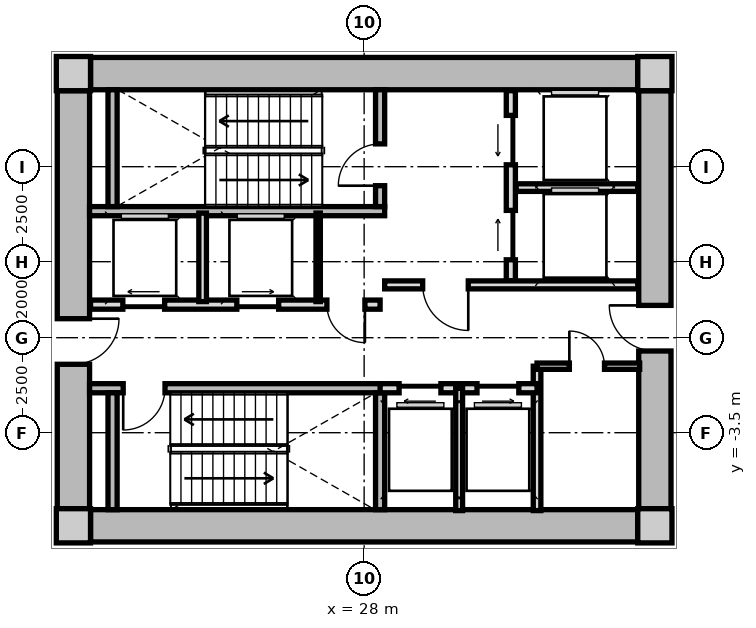
"""IFC4 building model, lengths in metres.
Left out: names, types, materials, properties, quantities, classifications, styles, units other than length and angle.
Written with IfcOpenShell. Run it as: python <this file> out.ifc"""

import sys

from ifc_helpers import new_model, si_unit, direction, frame, frame_2d, origin, origin_2d, place, context, subcontext, project, spatial, rectangle, extrude, source, transform, mapped, element, fill, save


model = new_model("IFC4")
c1 = context("Model", 3, precision=1e-05, world=origin(), true_north=direction((0.0, 1.0)))
c2 = subcontext(c1, "Body", "Model", "MODEL_VIEW")
j1 = project(units=[si_unit("LENGTHUNIT", "METRE"), si_unit("PLANEANGLEUNIT", "RADIAN")], contexts=[c1])
p1 = place(None, origin())
s1 = spatial("IfcSite", under=j1, at=p1, CompositionType="ELEMENT")
p2 = place(p1, origin())
s2 = spatial("IfcBuilding", under=s1, at=p2, CompositionType="ELEMENT")
p3 = place(p2, origin())
s3 = spatial("IfcBuildingStorey", under=s2, at=p3, CompositionType="ELEMENT", Elevation=0.0)
m1 = source(origin(), c2, "Body", "SweptSolid", [
    extrude(rectangle(XDim=0.9, YDim=0.9, at=origin_2d()), origin(), (0.0, 0.0, 1.0), 4.2),
])
for number, where, z_axis, x_axis in (
    (1, (20.35, -5.95, 0.0), (0.0, 0.0, 1.0), (1.0, 0.0, 0.0)),
    (2, (35.65, -5.95, 0.0), (0.0, 0.0, 1.0), (1.0, 0.0, 0.0)),
    (3, (35.65, 5.95, 0.0), (0.0, 0.0, 1.0), (1.0, 0.0, 0.0)),
    (4, (20.35, 5.95, 0.0), (0.0, 0.0, 1.0), (1.0, 0.0, 0.0)),
):
    element("IfcColumn", number, at=place(p3, frame(where, z_axis=z_axis, x_axis=x_axis)), inside=s3, PredefinedType="COLUMN", context=c2, shape_type="MappedRepresentation", body=[
        mapped(m1, transform((0.0, 0.0, 0.0), x_axis=(1.0, 0.0, 0.0), y_axis=(0.0, 1.0, 0.0), z_axis=(0.0, 0.0, 1.0), scale=1.0)),
    ])
m2 = source(origin(), c2, "Body", "SweptSolid", [
    extrude(rectangle(XDim=14.4, YDim=0.85, at=frame_2d((7.2, 0.0))), origin(), (0.0, 0.0, 1.0), 3.88),
])
for number, where, z_axis, x_axis in (
    (5, (20.8, 5.95, 0.0), (0.0, 0.0, 1.0), (1.0, 0.0, 0.0)),
    (6, (35.2, -5.95, 0.0), (0.0, 0.0, 1.0), (-1.0, 0.0, 0.0)),
):
    element("IfcWall", number, at=place(p3, frame(where, z_axis=z_axis, x_axis=x_axis)), inside=s3, PredefinedType="SHEAR", context=c2, shape_type="MappedRepresentation", body=[
        mapped(m2, transform((0.0, 0.0, 0.0), x_axis=(1.0, 0.0, 0.0), y_axis=(0.0, 1.0, 0.0), z_axis=(0.0, 0.0, 1.0), scale=1.0)),
    ])
m3 = source(origin(), c2, "Body", "SweptSolid", [
    extrude(rectangle(XDim=11.0, YDim=0.85, at=frame_2d((5.5, 0.0))), origin(), (0.0, 0.0, 1.0), 3.88),
])
p4 = place(p3, frame((20.35, -5.5, 0.0), z_axis=(0.0, 0.0, 1.0), x_axis=(0.0, 1.0, 0.0)))
e7 = element("IfcWall", 7, at=p4, inside=s3, PredefinedType="SHEAR", context=c2, shape_type="MappedRepresentation", body=[
    mapped(m3, transform((0.0, 0.0, 0.0), x_axis=(1.0, 0.0, 0.0), y_axis=(0.0, 1.0, 0.0), z_axis=(0.0, 0.0, 1.0), scale=1.0)),
])
p5 = place(p4, frame((3.8, 0.0, 0.0)))
e8 = element("IfcOpeningElement", 8, at=p5, cuts=e7, PredefinedType="OPENING", context=c2, shape_type="SweptSolid", body=[
    extrude(rectangle(XDim=1.2, YDim=2.15, at=frame_2d((0.6, 1.075))), frame((0.0, 0.435, 0.0), z_axis=(0.0, -1.0, 0.0), x_axis=(1.0, 0.0, 0.0)), (0.0, 0.0, 1.0), 0.87),
])
p6 = place(p3, frame((35.65, 5.5, 0.0), z_axis=(0.0, 0.0, 1.0), x_axis=(0.0, -1.0, 0.0)))
e9 = element("IfcWall", 9, at=p6, inside=s3, PredefinedType="SHEAR", context=c2, shape_type="MappedRepresentation", body=[
    mapped(m3, transform((0.0, 0.0, 0.0), x_axis=(1.0, 0.0, 0.0), y_axis=(0.0, 1.0, 0.0), z_axis=(0.0, 0.0, 1.0), scale=1.0)),
])
p7 = place(p6, frame((5.65, 0.0, 0.0)))
e10 = element("IfcOpeningElement", 10, at=p7, cuts=e9, PredefinedType="OPENING", context=c2, shape_type="SweptSolid", body=[
    extrude(rectangle(XDim=1.2, YDim=2.15, at=frame_2d((0.6, 1.075))), frame((0.0, 0.435, 0.0), z_axis=(0.0, -1.0, 0.0), x_axis=(1.0, 0.0, 0.0)), (0.0, 0.0, 1.0), 0.87),
])
m4 = source(origin(), c2, "Body", "SweptSolid", [
    extrude(rectangle(XDim=7.765, YDim=0.24, at=frame_2d((3.883, 0.0))), origin(), (0.0, 0.0, 1.0), 3.88),
])
p8 = place(p3, frame((20.775, 2.33, 0.0), z_axis=(0.0, 0.0, 1.0), x_axis=(1.0, 0.0, 0.0)))
e11 = element("IfcWall", 11, at=p8, inside=s3, PredefinedType="PARTITIONING", context=c2, shape_type="MappedRepresentation", body=[
    mapped(m4, transform((0.0, 0.0, 0.0), x_axis=(1.0, 0.0, 0.0), y_axis=(0.0, 1.0, 0.0), z_axis=(0.0, 0.0, 1.0), scale=1.0)),
])
m5 = source(origin(), c2, "Body", "SweptSolid", [
    extrude(rectangle(XDim=3.075, YDim=0.24, at=frame_2d((1.538, 0.0))), origin(), (0.0, 0.0, 1.0), 3.88),
])
p9 = place(p3, frame((21.38, 2.45, 0.0), z_axis=(0.0, 0.0, 1.0), x_axis=(0.0, 1.0, 0.0)))
e12 = element("IfcWall", 12, at=p9, inside=s3, PredefinedType="PARTITIONING", context=c2, shape_type="MappedRepresentation", body=[
    mapped(m5, transform((0.0, 0.0, 0.0), x_axis=(1.0, 0.0, 0.0), y_axis=(0.0, 1.0, 0.0), z_axis=(0.0, 0.0, 1.0), scale=1.0)),
])
p10 = place(p3, frame((28.42, 2.45, 0.0), z_axis=(0.0, 0.0, 1.0), x_axis=(0.0, 1.0, 0.0)))
e13 = element("IfcWall", 13, at=p10, inside=s3, PredefinedType="PARTITIONING", context=c2, shape_type="MappedRepresentation", body=[
    mapped(m5, transform((0.0, 0.0, 0.0), x_axis=(1.0, 0.0, 0.0), y_axis=(0.0, 1.0, 0.0), z_axis=(0.0, 0.0, 1.0), scale=1.0)),
])
p11 = place(p10, frame((0.55, 0.0, 0.0)))
e14 = element("IfcOpeningElement", 14, at=p11, cuts=e13, PredefinedType="OPENING", context=c2, shape_type="SweptSolid", body=[
    extrude(rectangle(XDim=1.1, YDim=2.15, at=frame_2d((0.55, 1.075))), frame((0.0, 0.13, 0.0), z_axis=(0.0, -1.0, 0.0), x_axis=(1.0, 0.0, 0.0)), (0.0, 0.0, 1.0), 0.26),
])
p12 = place(p3, frame((20.775, -2.33, 0.0), z_axis=(0.0, 0.0, 1.0), x_axis=(1.0, 0.0, 0.0)))
e15 = element("IfcWall", 15, at=p12, inside=s3, PredefinedType="PARTITIONING", context=c2, shape_type="MappedRepresentation", body=[
    mapped(m4, transform((0.0, 0.0, 0.0), x_axis=(1.0, 0.0, 0.0), y_axis=(0.0, 1.0, 0.0), z_axis=(0.0, 0.0, 1.0), scale=1.0)),
])
p13 = place(p12, frame((0.885, 0.0, 0.0)))
e16 = element("IfcOpeningElement", 16, at=p13, cuts=e15, PredefinedType="OPENING", context=c2, shape_type="SweptSolid", body=[
    extrude(rectangle(XDim=1.1, YDim=2.15, at=frame_2d((0.55, 1.075))), frame((0.0, 0.13, 0.0), z_axis=(0.0, -1.0, 0.0), x_axis=(1.0, 0.0, 0.0)), (0.0, 0.0, 1.0), 0.26),
])
for number, where, z_axis, x_axis in (
    (17, (21.38, -5.525, 0.0), (0.0, 0.0, 1.0), (0.0, 1.0, 0.0)),
    (18, (28.42, -5.525, 0.0), (0.0, 0.0, 1.0), (0.0, 1.0, 0.0)),
):
    element("IfcWall", number, at=place(p3, frame(where, z_axis=z_axis, x_axis=x_axis)), inside=s3, PredefinedType="PARTITIONING", context=c2, shape_type="MappedRepresentation", body=[
        mapped(m5, transform((0.0, 0.0, 0.0), x_axis=(1.0, 0.0, 0.0), y_axis=(0.0, 1.0, 0.0), z_axis=(0.0, 0.0, 1.0), scale=1.0)),
    ])
m6 = source(origin(), c2, "Body", "SweptSolid", [
    extrude(rectangle(XDim=5.0, YDim=0.24, at=frame_2d((2.5, 0.0))), origin(), (0.0, 0.0, 1.0), 3.865),
])
p14 = place(p3, frame((31.86, 0.5, 0.0), z_axis=(0.0, 0.0, 1.0), x_axis=(0.0, 1.0, 0.0)))
e19 = element("IfcWall", 19, at=p14, inside=s3, PredefinedType="PARTITIONING", context=c2, shape_type="MappedRepresentation", body=[
    mapped(m6, transform((0.0, 0.0, 0.0), x_axis=(1.0, 0.0, 0.0), y_axis=(0.0, 1.0, 0.0), z_axis=(0.0, 0.0, 1.0), scale=1.0)),
])
p15 = place(p14, frame((3.05, 0.0, 0.0)))
e20 = element("IfcOpeningElement", 20, at=p15, cuts=e19, PredefinedType="OPENING", context=c2, shape_type="SweptSolid", body=[
    extrude(rectangle(XDim=1.3, YDim=2.2, at=frame_2d((0.65, 1.1))), frame((0.0, 0.13, 0.0), z_axis=(0.0, -1.0, 0.0), x_axis=(1.0, 0.0, 0.0)), (0.0, 0.0, 1.0), 0.26),
])
p16 = place(p14, frame((0.55, 0.0, 0.0)))
e21 = element("IfcOpeningElement", 21, at=p16, cuts=e19, PredefinedType="OPENING", context=c2, shape_type="SweptSolid", body=[
    extrude(rectangle(XDim=1.3, YDim=2.2, at=frame_2d((0.65, 1.1))), frame((0.0, 0.13, 0.0), z_axis=(0.0, -1.0, 0.0), x_axis=(1.0, 0.0, 0.0)), (0.0, 0.0, 1.0), 0.26),
])
m7 = source(origin(), c2, "Body", "SweptSolid", [
    extrude(rectangle(XDim=3.2, YDim=0.2, at=frame_2d((1.6, 0.0))), origin(), (0.0, 0.0, 1.0), 3.865),
])
p17 = place(p3, frame((32.0, 2.95, 0.0), z_axis=(0.0, 0.0, 1.0), x_axis=(1.0, 0.0, 0.0)))
e22 = element("IfcWall", 22, at=p17, inside=s3, PredefinedType="PARTITIONING", context=c2, shape_type="MappedRepresentation", body=[
    mapped(m7, transform((0.0, 0.0, 0.0), x_axis=(1.0, 0.0, 0.0), y_axis=(0.0, 1.0, 0.0), z_axis=(0.0, 0.0, 1.0), scale=1.0)),
])
m8 = source(origin(), c2, "Body", "SweptSolid", [
    extrude(rectangle(XDim=6.66, YDim=0.21, at=frame_2d((3.33, 0.0))), origin(), (0.0, 0.0, 1.0), 3.865),
])
p18 = place(p3, frame((28.54, 0.39, 0.0), z_axis=(0.0, 0.0, 1.0), x_axis=(1.0, 0.0, 0.0)))
e23 = element("IfcWall", 23, at=p18, inside=s3, PredefinedType="PARTITIONING", context=c2, shape_type="MappedRepresentation", body=[
    mapped(m8, transform((0.0, 0.0, 0.0), x_axis=(1.0, 0.0, 0.0), y_axis=(0.0, 1.0, 0.0), z_axis=(0.0, 0.0, 1.0), scale=1.0)),
])
p19 = place(p18, frame((1.0, 0.0, 0.0)))
e24 = element("IfcOpeningElement", 24, at=p19, cuts=e23, PredefinedType="OPENING", context=c2, shape_type="SweptSolid", body=[
    extrude(rectangle(XDim=1.2, YDim=2.15, at=frame_2d((0.6, 1.075))), frame((0.0, 0.115, 0.0), z_axis=(0.0, -1.0, 0.0), x_axis=(1.0, 0.0, 0.0)), (0.0, 0.0, 1.0), 0.23),
])
m9 = source(origin(), c2, "Body", "SweptSolid", [
    extrude(rectangle(XDim=7.62, YDim=0.24, at=frame_2d((3.81, 0.0))), origin(), (0.0, 0.0, 1.0), 3.865),
])
p20 = place(p3, frame((20.8, -0.13, 0.0), z_axis=(0.0, 0.0, 1.0), x_axis=(1.0, 0.0, 0.0)))
e25 = element("IfcWall", 25, at=p20, inside=s3, PredefinedType="PARTITIONING", context=c2, shape_type="MappedRepresentation", body=[
    mapped(m9, transform((0.0, 0.0, 0.0), x_axis=(1.0, 0.0, 0.0), y_axis=(0.0, 1.0, 0.0), z_axis=(0.0, 0.0, 1.0), scale=1.0)),
])
p21 = place(p20, frame((6.22, 0.0, 0.0)))
e26 = element("IfcOpeningElement", 26, at=p21, cuts=e25, PredefinedType="OPENING", context=c2, shape_type="SweptSolid", body=[
    extrude(rectangle(XDim=1.0, YDim=2.1, at=frame_2d((0.5, 1.05))), frame((0.0, 0.13, 0.0), z_axis=(0.0, -1.0, 0.0), x_axis=(1.0, 0.0, 0.0)), (0.0, 0.0, 1.0), 0.26),
])
p22 = place(p20, frame((0.85, 0.0, 0.0)))
e27 = element("IfcOpeningElement", 27, at=p22, cuts=e25, PredefinedType="OPENING", context=c2, shape_type="SweptSolid", body=[
    extrude(rectangle(XDim=1.1, YDim=2.2, at=frame_2d((0.55, 1.1))), frame((0.0, 0.13, 0.0), z_axis=(0.0, -1.0, 0.0), x_axis=(1.0, 0.0, 0.0)), (0.0, 0.0, 1.0), 0.26),
])
p23 = place(p20, frame((3.85, 0.0, 0.0)))
e28 = element("IfcOpeningElement", 28, at=p23, cuts=e25, PredefinedType="OPENING", context=c2, shape_type="SweptSolid", body=[
    extrude(rectangle(XDim=1.1, YDim=2.2, at=frame_2d((0.55, 1.1))), frame((0.0, 0.13, 0.0), z_axis=(0.0, -1.0, 0.0), x_axis=(1.0, 0.0, 0.0)), (0.0, 0.0, 1.0), 0.26),
])
m10 = source(origin(), c2, "Body", "SweptSolid", [
    extrude(rectangle(XDim=2.33, YDim=0.115, at=frame_2d((1.165, 0.0))), origin(), (0.0, 0.0, 1.0), 3.865),
])
p24 = place(p3, frame((26.79, -0.05, 0.0), z_axis=(0.0, 0.0, 1.0), x_axis=(0.0, 1.0, 0.0)))
e29 = element("IfcWall", 29, at=p24, inside=s3, PredefinedType="PARTITIONING", context=c2, shape_type="MappedRepresentation", body=[
    mapped(m10, transform((0.0, 0.0, 0.0), x_axis=(1.0, 0.0, 0.0), y_axis=(0.0, 1.0, 0.0), z_axis=(0.0, 0.0, 1.0), scale=1.0)),
])
m11 = source(origin(), c2, "Body", "SweptSolid", [
    extrude(rectangle(XDim=2.33, YDim=0.2, at=frame_2d((1.165, 0.0))), origin(), (0.0, 0.0, 1.0), 3.865),
])
p25 = place(p3, frame((23.75, -0.05, 0.0), z_axis=(0.0, 0.0, 1.0), x_axis=(0.0, 1.0, 0.0)))
e30 = element("IfcWall", 30, at=p25, inside=s3, PredefinedType="PARTITIONING", context=c2, shape_type="MappedRepresentation", body=[
    mapped(m11, transform((0.0, 0.0, 0.0), x_axis=(1.0, 0.0, 0.0), y_axis=(0.0, 1.0, 0.0), z_axis=(0.0, 0.0, 1.0), scale=1.0)),
])
m12 = source(origin(), c2, "Body", "SweptSolid", [
    extrude(rectangle(XDim=3.8, YDim=0.2, at=frame_2d((1.9, 0.0))), origin(), (0.0, 0.0, 1.0), 3.865),
])
p26 = place(p3, frame((32.55, -5.55, 0.0), z_axis=(0.0, 0.0, 1.0), x_axis=(0.0, 1.0, 0.0)))
e31 = element("IfcWall", 31, at=p26, inside=s3, PredefinedType="PARTITIONING", context=c2, shape_type="MappedRepresentation", body=[
    mapped(m12, transform((0.0, 0.0, 0.0), x_axis=(1.0, 0.0, 0.0), y_axis=(0.0, 1.0, 0.0), z_axis=(0.0, 0.0, 1.0), scale=1.0)),
])
m13 = source(origin(), c2, "Body", "SweptSolid", [
    extrude(rectangle(XDim=4.13, YDim=0.24, at=frame_2d((2.065, 0.0))), origin(), (0.0, 0.0, 1.0), 3.865),
])
p27 = place(p3, frame((28.42, -2.33, 0.0), z_axis=(0.0, 0.0, 1.0), x_axis=(1.0, 0.0, 0.0)))
e32 = element("IfcWall", 32, at=p27, inside=s3, PredefinedType="PARTITIONING", context=c2, shape_type="MappedRepresentation", body=[
    mapped(m13, transform((0.0, 0.0, 0.0), x_axis=(1.0, 0.0, 0.0), y_axis=(0.0, 1.0, 0.0), z_axis=(0.0, 0.0, 1.0), scale=1.0)),
])
p28 = place(p27, frame((0.5, 0.0, 0.0)))
e33 = element("IfcOpeningElement", 33, at=p28, cuts=e32, PredefinedType="OPENING", context=c2, shape_type="SweptSolid", body=[
    extrude(rectangle(XDim=1.1, YDim=2.2, at=frame_2d((0.55, 1.1))), frame((0.0, 0.13, 0.0), z_axis=(0.0, -1.0, 0.0), x_axis=(1.0, 0.0, 0.0)), (0.0, 0.0, 1.0), 0.26),
])
p29 = place(p27, frame((2.55, 0.0, 0.0)))
e34 = element("IfcOpeningElement", 34, at=p29, cuts=e32, PredefinedType="OPENING", context=c2, shape_type="SweptSolid", body=[
    extrude(rectangle(XDim=1.1, YDim=2.2, at=frame_2d((0.55, 1.1))), frame((0.0, 0.13, 0.0), z_axis=(0.0, -1.0, 0.0), x_axis=(1.0, 0.0, 0.0)), (0.0, 0.0, 1.0), 0.26),
])
m14 = source(origin(), c2, "Body", "SweptSolid", [
    extrude(rectangle(XDim=3.22, YDim=0.18, at=frame_2d((1.61, 0.0))), origin(), (0.0, 0.0, 1.0), 3.865),
])
p30 = place(p3, frame((30.5, -5.55, 0.0), z_axis=(0.0, 0.0, 1.0), x_axis=(0.0, 1.0, 0.0)))
e35 = element("IfcWall", 35, at=p30, inside=s3, PredefinedType="PARTITIONING", context=c2, shape_type="MappedRepresentation", body=[
    mapped(m14, transform((0.0, 0.0, 0.0), x_axis=(1.0, 0.0, 0.0), y_axis=(0.0, 1.0, 0.0), z_axis=(0.0, 0.0, 1.0), scale=1.0)),
])
m15 = source(origin(), c2, "Body", "SweptSolid", [
    extrude(rectangle(XDim=2.7, YDim=0.165, at=frame_2d((1.35, 0.0))), origin(), (0.0, 0.0, 1.0), 3.865),
])
p31 = place(p3, frame((32.55, -1.75, 0.0), z_axis=(0.0, 0.0, 1.0), x_axis=(1.0, 0.0, 0.0)))
e36 = element("IfcWall", 36, at=p31, inside=s3, PredefinedType="PARTITIONING", context=c2, shape_type="MappedRepresentation", body=[
    mapped(m15, transform((0.0, 0.0, 0.0), x_axis=(1.0, 0.0, 0.0), y_axis=(0.0, 1.0, 0.0), z_axis=(0.0, 0.0, 1.0), scale=1.0)),
])
p32 = place(p31, frame((0.85, 0.0, 0.0)))
e37 = element("IfcOpeningElement", 37, at=p32, cuts=e36, PredefinedType="OPENING", context=c2, shape_type="SweptSolid", body=[
    extrude(rectangle(XDim=0.925, YDim=2.1, at=frame_2d((0.462, 1.05))), frame((0.0, 0.093, 0.0), z_axis=(0.0, -1.0, 0.0), x_axis=(1.0, 0.0, 0.0)), (0.0, 0.0, 1.0), 0.185),
])
m16 = source(origin(), c2, "Body", "SweptSolid", [
    extrude(rectangle(XDim=1.1, YDim=2.15, at=frame_2d((0.55, 1.075))), frame((0.0, 0.025, 0.0), z_axis=(0.0, -1.0, 0.0), x_axis=(1.0, 0.0, 0.0)), (0.0, 0.0, 1.0), 0.05),
])
p33 = place(p11, origin())
e38 = element("IfcDoor", 38, at=p33, inside=s3, OperationType="SINGLE_SWING_LEFT", PredefinedType="DOOR", context=c2, shape_type="MappedRepresentation", body=[
    mapped(m16, transform((0.0, 0.0, 0.0), x_axis=(1.0, 0.0, 0.0), y_axis=(0.0, 1.0, 0.0), z_axis=(0.0, 0.0, 1.0), scale=1.0)),
])
fill(e14, e38)
p34 = place(p13, frame((1.1, 0.0, 0.0), z_axis=(0.0, 0.0, 1.0), x_axis=(-1.0, 0.0, 0.0)))
e39 = element("IfcDoor", 39, at=p34, inside=s3, OperationType="SINGLE_SWING_RIGHT", PredefinedType="DOOR", context=c2, shape_type="MappedRepresentation", body=[
    mapped(m16, transform((0.0, 0.0, 0.0), x_axis=(1.0, 0.0, 0.0), y_axis=(0.0, 1.0, 0.0), z_axis=(0.0, 0.0, 1.0), scale=1.0)),
])
fill(e16, e39)
m17 = source(origin(), c2, "Body", "SweptSolid", [
    extrude(rectangle(XDim=1.3, YDim=2.2, at=frame_2d((0.65, 1.1))), frame((0.0, 0.025, 0.0), z_axis=(0.0, -1.0, 0.0), x_axis=(1.0, 0.0, 0.0)), (0.0, 0.0, 1.0), 0.05),
])
p35 = place(p15, origin())
e40 = element("IfcDoor", 40, at=p35, inside=s3, OperationType="SLIDING_TO_LEFT", PredefinedType="DOOR", context=c2, shape_type="MappedRepresentation", body=[
    mapped(m17, transform((0.0, 0.0, 0.0), x_axis=(1.0, 0.0, 0.0), y_axis=(0.0, 1.0, 0.0), z_axis=(0.0, 0.0, 1.0), scale=1.0)),
])
fill(e20, e40)
p36 = place(p16, origin())
e41 = element("IfcDoor", 41, at=p36, inside=s3, OperationType="SLIDING_TO_RIGHT", PredefinedType="DOOR", context=c2, shape_type="MappedRepresentation", body=[
    mapped(m17, transform((0.0, 0.0, 0.0), x_axis=(1.0, 0.0, 0.0), y_axis=(0.0, 1.0, 0.0), z_axis=(0.0, 0.0, 1.0), scale=1.0)),
])
fill(e21, e41)
m18 = source(origin(), c2, "Body", "SweptSolid", [
    extrude(rectangle(XDim=1.2, YDim=2.15, at=frame_2d((0.6, 1.075))), frame((0.0, 0.025, 0.0), z_axis=(0.0, -1.0, 0.0), x_axis=(1.0, 0.0, 0.0)), (0.0, 0.0, 1.0), 0.05),
])
p37 = place(p19, frame((1.2, 0.0, 0.0), z_axis=(0.0, 0.0, 1.0), x_axis=(-1.0, 0.0, 0.0)))
e42 = element("IfcDoor", 42, at=p37, inside=s3, OperationType="SINGLE_SWING_LEFT", PredefinedType="DOOR", context=c2, shape_type="MappedRepresentation", body=[
    mapped(m18, transform((0.0, 0.0, 0.0), x_axis=(1.0, 0.0, 0.0), y_axis=(0.0, 1.0, 0.0), z_axis=(0.0, 0.0, 1.0), scale=1.0)),
])
fill(e24, e42)
p38 = place(p5, frame((1.2, 0.0, 0.0), z_axis=(0.0, 0.0, 1.0), x_axis=(-1.0, 0.0, 0.0)))
e43 = element("IfcDoor", 43, at=p38, inside=s3, OperationType="SINGLE_SWING_LEFT", PredefinedType="DOOR", context=c2, shape_type="MappedRepresentation", body=[
    mapped(m18, transform((0.0, 0.0, 0.0), x_axis=(1.0, 0.0, 0.0), y_axis=(0.0, 1.0, 0.0), z_axis=(0.0, 0.0, 1.0), scale=1.0)),
])
fill(e8, e43)
p39 = place(p7, frame((1.2, 0.0, 0.0), z_axis=(0.0, 0.0, 1.0), x_axis=(-1.0, 0.0, 0.0)))
e44 = element("IfcDoor", 44, at=p39, inside=s3, OperationType="SINGLE_SWING_RIGHT", PredefinedType="DOOR", context=c2, shape_type="MappedRepresentation", body=[
    mapped(m18, transform((0.0, 0.0, 0.0), x_axis=(1.0, 0.0, 0.0), y_axis=(0.0, 1.0, 0.0), z_axis=(0.0, 0.0, 1.0), scale=1.0)),
])
fill(e10, e44)
m19 = source(origin(), c2, "Body", "SweptSolid", [
    extrude(rectangle(XDim=1.0, YDim=2.1, at=frame_2d((0.5, 1.05))), frame((0.0, 0.025, 0.0), z_axis=(0.0, -1.0, 0.0), x_axis=(1.0, 0.0, 0.0)), (0.0, 0.0, 1.0), 0.05),
])
p40 = place(p21, frame((1.0, 0.0, 0.0), z_axis=(0.0, 0.0, 1.0), x_axis=(-1.0, 0.0, 0.0)))
e45 = element("IfcDoor", 45, at=p40, inside=s3, OperationType="SINGLE_SWING_LEFT", PredefinedType="DOOR", context=c2, shape_type="MappedRepresentation", body=[
    mapped(m19, transform((0.0, 0.0, 0.0), x_axis=(1.0, 0.0, 0.0), y_axis=(0.0, 1.0, 0.0), z_axis=(0.0, 0.0, 1.0), scale=1.0)),
])
fill(e26, e45)
m20 = source(origin(), c2, "Body", "SweptSolid", [
    extrude(rectangle(XDim=1.1, YDim=2.2, at=frame_2d((0.55, 1.1))), frame((0.0, 0.025, 0.0), z_axis=(0.0, -1.0, 0.0), x_axis=(1.0, 0.0, 0.0)), (0.0, 0.0, 1.0), 0.05),
])
p41 = place(p22, origin())
e46 = element("IfcDoor", 46, at=p41, inside=s3, OperationType="SLIDING_TO_LEFT", PredefinedType="DOOR", context=c2, shape_type="MappedRepresentation", body=[
    mapped(m20, transform((0.0, 0.0, 0.0), x_axis=(1.0, 0.0, 0.0), y_axis=(0.0, 1.0, 0.0), z_axis=(0.0, 0.0, 1.0), scale=1.0)),
])
fill(e27, e46)
p42 = place(p23, origin())
e47 = element("IfcDoor", 47, at=p42, inside=s3, OperationType="SLIDING_TO_RIGHT", PredefinedType="DOOR", context=c2, shape_type="MappedRepresentation", body=[
    mapped(m20, transform((0.0, 0.0, 0.0), x_axis=(1.0, 0.0, 0.0), y_axis=(0.0, 1.0, 0.0), z_axis=(0.0, 0.0, 1.0), scale=1.0)),
])
fill(e28, e47)
p43 = place(p28, frame((1.1, 0.0, 0.0), z_axis=(0.0, 0.0, 1.0), x_axis=(-1.0, 0.0, 0.0)))
e48 = element("IfcDoor", 48, at=p43, inside=s3, OperationType="SLIDING_TO_LEFT", PredefinedType="DOOR", context=c2, shape_type="MappedRepresentation", body=[
    mapped(m20, transform((0.0, 0.0, 0.0), x_axis=(1.0, 0.0, 0.0), y_axis=(0.0, 1.0, 0.0), z_axis=(0.0, 0.0, 1.0), scale=1.0)),
])
fill(e33, e48)
p44 = place(p29, frame((1.1, 0.0, 0.0), z_axis=(0.0, 0.0, 1.0), x_axis=(-1.0, 0.0, 0.0)))
e49 = element("IfcDoor", 49, at=p44, inside=s3, OperationType="SLIDING_TO_RIGHT", PredefinedType="DOOR", context=c2, shape_type="MappedRepresentation", body=[
    mapped(m20, transform((0.0, 0.0, 0.0), x_axis=(1.0, 0.0, 0.0), y_axis=(0.0, 1.0, 0.0), z_axis=(0.0, 0.0, 1.0), scale=1.0)),
])
fill(e34, e49)
m21 = source(origin(), c2, "Body", "SweptSolid", [
    extrude(rectangle(XDim=0.925, YDim=2.1, at=frame_2d((0.462, 1.05))), frame((0.0, 0.025, 0.0), z_axis=(0.0, -1.0, 0.0), x_axis=(1.0, 0.0, 0.0)), (0.0, 0.0, 1.0), 0.05),
])
p45 = place(p32, origin())
e50 = element("IfcDoor", 50, at=p45, inside=s3, OperationType="SINGLE_SWING_LEFT", PredefinedType="DOOR", context=c2, shape_type="MappedRepresentation", body=[
    mapped(m21, transform((0.0, 0.0, 0.0), x_axis=(1.0, 0.0, 0.0), y_axis=(0.0, 1.0, 0.0), z_axis=(0.0, 0.0, 1.0), scale=1.0)),
])
fill(e37, e50)
save(model, sys.argv[1])
